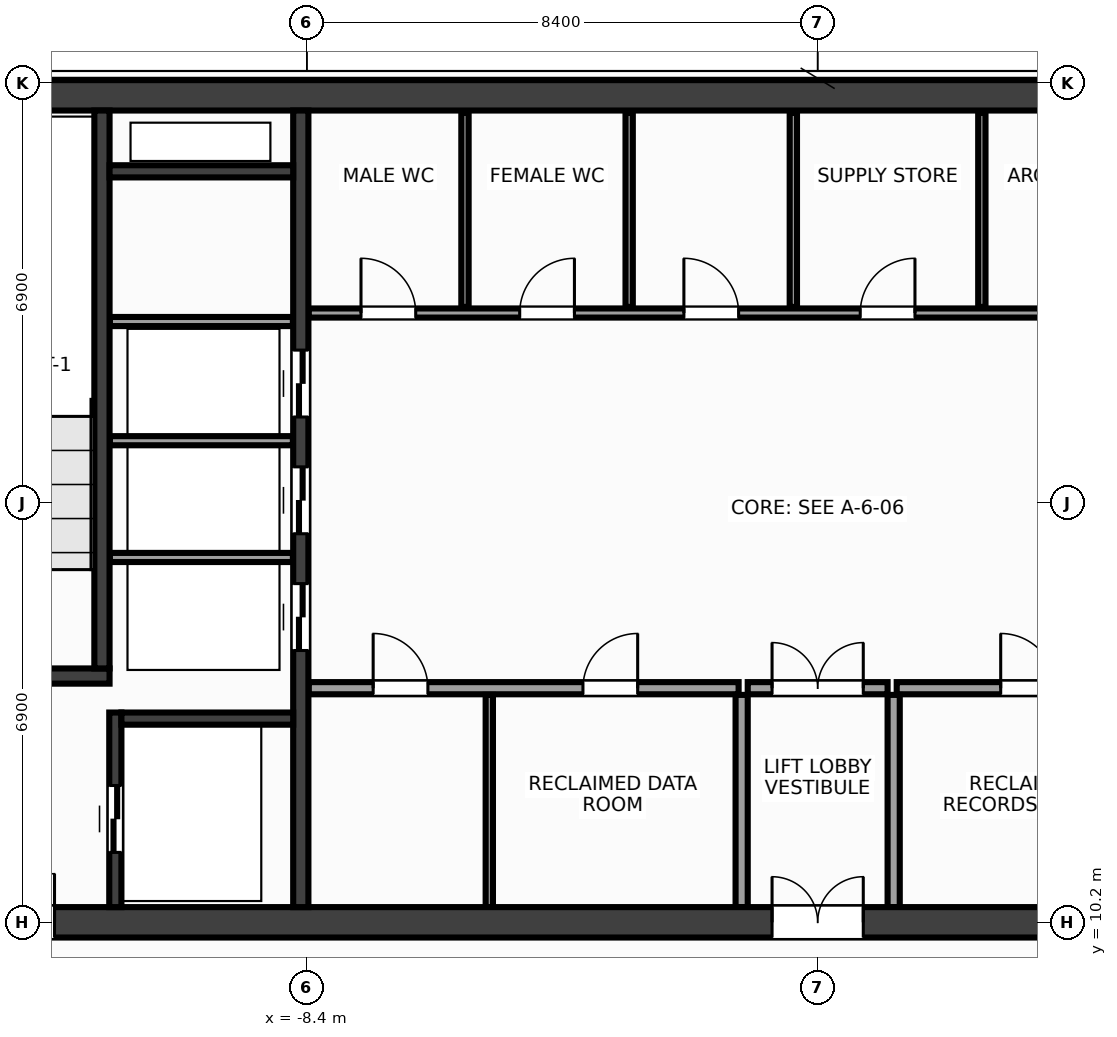
"""IFC4 building model, lengths in metres.
Left out: names, types, materials, properties, quantities, classifications, styles, units other than length and angle.
Written with IfcOpenShell. Run it as: python <this file> out.ifc"""

import sys

from ifc_helpers import new_model, si_unit, direction, frame, frame_2d, origin, place, context, subcontext, project, spatial, rectangle, extrude, source, transform, mapped, element, fill, save


model = new_model("IFC4")
c1 = context("Model", 3, precision=1e-05, world=origin(), true_north=direction((0.0, 1.0)))
c2 = subcontext(c1, "Body", "Model", "MODEL_VIEW")
j1 = project(units=[si_unit("LENGTHUNIT", "METRE"), si_unit("PLANEANGLEUNIT", "RADIAN")], contexts=[c1])
p1 = place(None, origin())
s1 = spatial("IfcSite", under=j1, at=p1, CompositionType="ELEMENT")
p2 = place(p1, origin())
s2 = spatial("IfcBuilding", under=s1, at=p2, CompositionType="ELEMENT")
p3 = place(p2, frame((0.0, 0.0, 254.0)))
s3 = spatial("IfcBuildingStorey", under=s2, at=p3, CompositionType="ELEMENT", Elevation=254.0)
m1 = source(origin(), c2, "Body", "SweptSolid", [
    extrude(rectangle(XDim=31.7, YDim=0.5, at=frame_2d((15.85, 0.0))), origin(), (0.0, 0.0, 1.0), 3.6),
])
p4 = place(p3, frame((-15.85, 23.8, 0.0), z_axis=(0.0, 0.0, 1.0), x_axis=(1.0, 0.0, 0.0)))
e1 = element("IfcWall", 1, at=p4, inside=s3, PredefinedType="SHEAR", context=c2, shape_type="MappedRepresentation", body=[
    mapped(m1, transform((0.0, 0.0, 0.0), x_axis=(1.0, 0.0, 0.0), y_axis=(0.0, 1.0, 0.0), z_axis=(0.0, 0.0, 1.0), scale=1.0)),
])
p5 = place(p3, frame((-15.85, 10.2, 0.0), z_axis=(0.0, 0.0, 1.0), x_axis=(1.0, 0.0, 0.0)))
e2 = element("IfcWall", 2, at=p5, inside=s3, PredefinedType="SHEAR", context=c2, shape_type="MappedRepresentation", body=[
    mapped(m1, transform((0.0, 0.0, 0.0), x_axis=(1.0, 0.0, 0.0), y_axis=(0.0, 1.0, 0.0), z_axis=(0.0, 0.0, 1.0), scale=1.0)),
])
p6 = place(p5, frame((1.7, 0.0, 0.0)))
e3 = element("IfcOpeningElement", 3, at=p6, cuts=e2, PredefinedType="OPENING", context=c2, shape_type="SweptSolid", body=[
    extrude(rectangle(XDim=1.6, YDim=2.15, at=frame_2d((0.8, 1.075))), frame((0.0, 0.262, 0.0), z_axis=(0.0, -1.0, 0.0), x_axis=(1.0, 0.0, 0.0)), (0.0, 0.0, 1.0), 0.524),
])
p7 = place(p5, frame((28.4, 0.0, 0.0)))
e4 = element("IfcOpeningElement", 4, at=p7, cuts=e2, PredefinedType="OPENING", context=c2, shape_type="SweptSolid", body=[
    extrude(rectangle(XDim=1.6, YDim=2.15, at=frame_2d((0.8, 1.075))), frame((0.0, 0.262, 0.0), z_axis=(0.0, -1.0, 0.0), x_axis=(1.0, 0.0, 0.0)), (0.0, 0.0, 1.0), 0.524),
])
p8 = place(p5, frame((15.1, 0.0, 0.0)))
e5 = element("IfcOpeningElement", 5, at=p8, cuts=e2, PredefinedType="OPENING", context=c2, shape_type="SweptSolid", body=[
    extrude(rectangle(XDim=1.5, YDim=2.2, at=frame_2d((0.75, 1.1))), frame((0.0, 0.262, 0.0), z_axis=(0.0, -1.0, 0.0), x_axis=(1.0, 0.0, 0.0)), (0.0, 0.0, 1.0), 0.524),
])
m2 = source(origin(), c2, "Body", "SweptSolid", [
    extrude(rectangle(XDim=13.1, YDim=0.25, at=frame_2d((6.55, 0.0))), origin(), (0.0, 0.0, 1.0), 3.6),
])
p9 = place(p3, frame((-8.5, 10.45, 0.0), z_axis=(0.0, 0.0, 1.0), x_axis=(0.0, 1.0, 0.0)))
e6 = element("IfcWall", 6, at=p9, inside=s3, PredefinedType="SHEAR", context=c2, shape_type="MappedRepresentation", body=[
    mapped(m2, transform((0.0, 0.0, 0.0), x_axis=(1.0, 0.0, 0.0), y_axis=(0.0, 1.0, 0.0), z_axis=(0.0, 0.0, 1.0), scale=1.0)),
])
p10 = place(p9, frame((4.22, 0.0, 0.0)))
e7 = element("IfcOpeningElement", 7, at=p10, cuts=e6, PredefinedType="OPENING", context=c2, shape_type="SweptSolid", body=[
    extrude(rectangle(XDim=1.1, YDim=2.15, at=frame_2d((0.55, 1.075))), frame((0.0, 0.137, 0.0), z_axis=(0.0, -1.0, 0.0), x_axis=(1.0, 0.0, 0.0)), (0.0, 0.0, 1.0), 0.274),
])
p11 = place(p9, frame((6.14, 0.0, 0.0)))
e8 = element("IfcOpeningElement", 8, at=p11, cuts=e6, PredefinedType="OPENING", context=c2, shape_type="SweptSolid", body=[
    extrude(rectangle(XDim=1.1, YDim=2.15, at=frame_2d((0.55, 1.075))), frame((0.0, 0.137, 0.0), z_axis=(0.0, -1.0, 0.0), x_axis=(1.0, 0.0, 0.0)), (0.0, 0.0, 1.0), 0.274),
])
p12 = place(p9, frame((8.06, 0.0, 0.0)))
e9 = element("IfcOpeningElement", 9, at=p12, cuts=e6, PredefinedType="OPENING", context=c2, shape_type="SweptSolid", body=[
    extrude(rectangle(XDim=1.1, YDim=2.15, at=frame_2d((0.55, 1.075))), frame((0.0, 0.137, 0.0), z_axis=(0.0, -1.0, 0.0), x_axis=(1.0, 0.0, 0.0)), (0.0, 0.0, 1.0), 0.274),
])
m3 = source(origin(), c2, "Body", "SweptSolid", [
    extrude(rectangle(XDim=3.705, YDim=0.25, at=frame_2d((1.853, 0.0))), origin(), (0.0, 0.0, 1.0), 3.6),
])
p13 = place(p3, frame((-15.35, 14.25, 0.0), z_axis=(0.0, 0.0, 1.0), x_axis=(1.0, 0.0, 0.0)))
e10 = element("IfcWall", 10, at=p13, inside=s3, PredefinedType="SHEAR", context=c2, shape_type="MappedRepresentation", body=[
    mapped(m3, transform((0.0, 0.0, 0.0), x_axis=(1.0, 0.0, 0.0), y_axis=(0.0, 1.0, 0.0), z_axis=(0.0, 0.0, 1.0), scale=1.0)),
])
p14 = place(p13, frame((0.95, 0.0, 0.0)))
e11 = element("IfcOpeningElement", 11, at=p14, cuts=e10, PredefinedType="OPENING", context=c2, shape_type="SweptSolid", body=[
    extrude(rectangle(XDim=1.6, YDim=2.15, at=frame_2d((0.8, 1.075))), frame((0.0, 0.137, 0.0), z_axis=(0.0, -1.0, 0.0), x_axis=(1.0, 0.0, 0.0)), (0.0, 0.0, 1.0), 0.274),
])
m4 = source(origin(), c2, "Body", "SweptSolid", [
    extrude(rectangle(XDim=9.175, YDim=0.25, at=frame_2d((4.587, 0.0))), origin(), (0.0, 0.0, 1.0), 3.6),
])
p15 = place(p3, frame((-11.77, 14.375, 0.0), z_axis=(0.0, 0.0, 1.0), x_axis=(0.0, 1.0, 0.0)))
e12 = element("IfcWall", 12, at=p15, inside=s3, PredefinedType="SHEAR", context=c2, shape_type="MappedRepresentation", body=[
    mapped(m4, transform((0.0, 0.0, 0.0), x_axis=(1.0, 0.0, 0.0), y_axis=(0.0, 1.0, 0.0), z_axis=(0.0, 0.0, 1.0), scale=1.0)),
])
m5 = source(origin(), c2, "Body", "SweptSolid", [
    extrude(rectangle(XDim=3.2, YDim=0.2, at=frame_2d((1.6, 0.0))), origin(), (0.0, 0.0, 1.0), 3.6),
])
p16 = place(p3, frame((-11.55, 10.45, 0.0), z_axis=(0.0, 0.0, 1.0), x_axis=(0.0, 1.0, 0.0)))
e13 = element("IfcWall", 13, at=p16, inside=s3, PredefinedType="SHEAR", context=c2, shape_type="MappedRepresentation", body=[
    mapped(m5, transform((0.0, 0.0, 0.0), x_axis=(1.0, 0.0, 0.0), y_axis=(0.0, 1.0, 0.0), z_axis=(0.0, 0.0, 1.0), scale=1.0)),
])
p17 = place(p16, frame((0.9, 0.0, 0.0)))
e14 = element("IfcOpeningElement", 14, at=p17, cuts=e13, PredefinedType="OPENING", context=c2, shape_type="SweptSolid", body=[
    extrude(rectangle(XDim=1.1, YDim=2.15, at=frame_2d((0.55, 1.075))), frame((0.0, 0.112, 0.0), z_axis=(0.0, -1.0, 0.0), x_axis=(1.0, 0.0, 0.0)), (0.0, 0.0, 1.0), 0.224),
])
m6 = source(origin(), c2, "Body", "SweptSolid", [
    extrude(rectangle(XDim=2.825, YDim=0.2, at=frame_2d((1.413, 0.0))), origin(), (0.0, 0.0, 1.0), 3.6),
])
p18 = place(p3, frame((-11.45, 13.55, 0.0), z_axis=(0.0, 0.0, 1.0), x_axis=(1.0, 0.0, 0.0)))
e15 = element("IfcWall", 15, at=p18, inside=s3, PredefinedType="SHEAR", context=c2, shape_type="MappedRepresentation", body=[
    mapped(m6, transform((0.0, 0.0, 0.0), x_axis=(1.0, 0.0, 0.0), y_axis=(0.0, 1.0, 0.0), z_axis=(0.0, 0.0, 1.0), scale=1.0)),
])
m7 = source(origin(), c2, "Body", "SweptSolid", [
    extrude(rectangle(XDim=3.02, YDim=0.2, at=frame_2d((1.51, 0.0))), origin(), (0.0, 0.0, 1.0), 3.6),
])
p19 = place(p3, frame((-11.645, 22.55, 0.0), z_axis=(0.0, 0.0, 1.0), x_axis=(1.0, 0.0, 0.0)))
e16 = element("IfcWall", 16, at=p19, inside=s3, PredefinedType="SHEAR", context=c2, shape_type="MappedRepresentation", body=[
    mapped(m7, transform((0.0, 0.0, 0.0), x_axis=(1.0, 0.0, 0.0), y_axis=(0.0, 1.0, 0.0), z_axis=(0.0, 0.0, 1.0), scale=1.0)),
])
m8 = source(origin(), c2, "Body", "SweptSolid", [
    extrude(rectangle(XDim=3.01, YDim=0.15, at=frame_2d((1.505, 0.0))), origin(), (0.0, 0.0, 1.0), 3.37),
])
for number, where, z_axis, x_axis in (
    (17, (-11.64, 16.2, 0.0), (0.0, 0.0, 1.0), (1.0, 0.0, 0.0)),
    (18, (-11.64, 18.12, 0.0), (0.0, 0.0, 1.0), (1.0, 0.0, 0.0)),
    (19, (-11.64, 20.08, 0.0), (0.0, 0.0, 1.0), (1.0, 0.0, 0.0)),
):
    element("IfcWall", number, at=place(p3, frame(where, z_axis=z_axis, x_axis=x_axis)), inside=s3, PredefinedType="PARTITIONING", context=c2, shape_type="MappedRepresentation", body=[
        mapped(m8, transform((0.0, 0.0, 0.0), x_axis=(1.0, 0.0, 0.0), y_axis=(0.0, 1.0, 0.0), z_axis=(0.0, 0.0, 1.0), scale=1.0)),
    ])
m9 = source(origin(), c2, "Body", "SweptSolid", [
    extrude(rectangle(XDim=7.07, YDim=0.2, at=frame_2d((3.535, 0.0))), origin(), (0.0, 0.0, 1.0), 3.37),
])
p20 = place(p3, frame((-8.37, 14.05, 0.0), z_axis=(0.0, 0.0, 1.0), x_axis=(1.0, 0.0, 0.0)))
e20 = element("IfcWall", 20, at=p20, inside=s3, PredefinedType="PARTITIONING", context=c2, shape_type="MappedRepresentation", body=[
    mapped(m9, transform((0.0, 0.0, 0.0), x_axis=(1.0, 0.0, 0.0), y_axis=(0.0, 1.0, 0.0), z_axis=(0.0, 0.0, 1.0), scale=1.0)),
])
p21 = place(p20, frame((1.06, 0.0, 0.0)))
e21 = element("IfcOpeningElement", 21, at=p21, cuts=e20, PredefinedType="OPENING", context=c2, shape_type="SweptSolid", body=[
    extrude(rectangle(XDim=0.9, YDim=2.15, at=frame_2d((0.45, 1.075))), frame((0.0, 0.112, 0.0), z_axis=(0.0, -1.0, 0.0), x_axis=(1.0, 0.0, 0.0)), (0.0, 0.0, 1.0), 0.224),
])
p22 = place(p20, frame((4.51, 0.0, 0.0)))
e22 = element("IfcOpeningElement", 22, at=p22, cuts=e20, PredefinedType="OPENING", context=c2, shape_type="SweptSolid", body=[
    extrude(rectangle(XDim=0.9, YDim=2.15, at=frame_2d((0.45, 1.075))), frame((0.0, 0.112, 0.0), z_axis=(0.0, -1.0, 0.0), x_axis=(1.0, 0.0, 0.0)), (0.0, 0.0, 1.0), 0.224),
])
p23 = place(p3, frame((1.3, 14.05, 0.0), z_axis=(0.0, 0.0, 1.0), x_axis=(1.0, 0.0, 0.0)))
e23 = element("IfcWall", 23, at=p23, inside=s3, PredefinedType="PARTITIONING", context=c2, shape_type="MappedRepresentation", body=[
    mapped(m9, transform((0.0, 0.0, 0.0), x_axis=(1.0, 0.0, 0.0), y_axis=(0.0, 1.0, 0.0), z_axis=(0.0, 0.0, 1.0), scale=1.0)),
])
p24 = place(p23, frame((1.71, 0.0, 0.0)))
e24 = element("IfcOpeningElement", 24, at=p24, cuts=e23, PredefinedType="OPENING", context=c2, shape_type="SweptSolid", body=[
    extrude(rectangle(XDim=0.9, YDim=2.15, at=frame_2d((0.45, 1.075))), frame((0.0, 0.112, 0.0), z_axis=(0.0, -1.0, 0.0), x_axis=(1.0, 0.0, 0.0)), (0.0, 0.0, 1.0), 0.224),
])
p25 = place(p23, frame((5.16, 0.0, 0.0)))
e25 = element("IfcOpeningElement", 25, at=p25, cuts=e23, PredefinedType="OPENING", context=c2, shape_type="SweptSolid", body=[
    extrude(rectangle(XDim=0.9, YDim=2.15, at=frame_2d((0.45, 1.075))), frame((0.0, 0.112, 0.0), z_axis=(0.0, -1.0, 0.0), x_axis=(1.0, 0.0, 0.0)), (0.0, 0.0, 1.0), 0.224),
])
m10 = source(origin(), c2, "Body", "SweptSolid", [
    extrude(rectangle(XDim=3.49, YDim=0.2, at=frame_2d((1.745, 0.0))), origin(), (0.0, 0.0, 1.0), 3.37),
])
for number, where, z_axis, x_axis in (
    (26, (-1.25, 10.45, 0.0), (0.0, 0.0, 1.0), (0.0, 1.0, 0.0)),
    (27, (1.25, 10.45, 0.0), (0.0, 0.0, 1.0), (0.0, 1.0, 0.0)),
):
    element("IfcWall", number, at=place(p3, frame(where, z_axis=z_axis, x_axis=x_axis)), inside=s3, PredefinedType="PARTITIONING", context=c2, shape_type="MappedRepresentation", body=[
        mapped(m10, transform((0.0, 0.0, 0.0), x_axis=(1.0, 0.0, 0.0), y_axis=(0.0, 1.0, 0.0), z_axis=(0.0, 0.0, 1.0), scale=1.0)),
    ])
m11 = source(origin(), c2, "Body", "SweptSolid", [
    extrude(rectangle(XDim=2.3, YDim=0.2, at=frame_2d((1.15, 0.0))), origin(), (0.0, 0.0, 1.0), 3.37),
])
p26 = place(p3, frame((-1.15, 14.05, 0.0), z_axis=(0.0, 0.0, 1.0), x_axis=(1.0, 0.0, 0.0)))
e28 = element("IfcWall", 28, at=p26, inside=s3, PredefinedType="PARTITIONING", context=c2, shape_type="MappedRepresentation", body=[
    mapped(m11, transform((0.0, 0.0, 0.0), x_axis=(1.0, 0.0, 0.0), y_axis=(0.0, 1.0, 0.0), z_axis=(0.0, 0.0, 1.0), scale=1.0)),
])
p27 = place(p26, frame((0.4, 0.0, 0.0)))
e29 = element("IfcOpeningElement", 29, at=p27, cuts=e28, PredefinedType="OPENING", context=c2, shape_type="SweptSolid", body=[
    extrude(rectangle(XDim=1.5, YDim=2.2, at=frame_2d((0.75, 1.1))), frame((0.0, 0.112, 0.0), z_axis=(0.0, -1.0, 0.0), x_axis=(1.0, 0.0, 0.0)), (0.0, 0.0, 1.0), 0.224),
])
m12 = source(origin(), c2, "Body", "SweptSolid", [
    extrude(rectangle(XDim=14.59, YDim=0.15, at=frame_2d((7.295, 0.0))), origin(), (0.0, 0.0, 1.0), 3.37),
])
p28 = place(p3, frame((-8.37, 20.22, 0.0), z_axis=(0.0, 0.0, 1.0), x_axis=(1.0, 0.0, 0.0)))
e30 = element("IfcWall", 30, at=p28, inside=s3, PredefinedType="PARTITIONING", context=c2, shape_type="MappedRepresentation", body=[
    mapped(m12, transform((0.0, 0.0, 0.0), x_axis=(1.0, 0.0, 0.0), y_axis=(0.0, 1.0, 0.0), z_axis=(0.0, 0.0, 1.0), scale=1.0)),
])
p29 = place(p28, frame((0.86, 0.0, 0.0)))
e31 = element("IfcOpeningElement", 31, at=p29, cuts=e30, PredefinedType="OPENING", context=c2, shape_type="SweptSolid", body=[
    extrude(rectangle(XDim=0.9, YDim=2.15, at=frame_2d((0.45, 1.075))), frame((0.0, 0.087, 0.0), z_axis=(0.0, -1.0, 0.0), x_axis=(1.0, 0.0, 0.0)), (0.0, 0.0, 1.0), 0.174),
])
p30 = place(p28, frame((3.47, 0.0, 0.0)))
e32 = element("IfcOpeningElement", 32, at=p30, cuts=e30, PredefinedType="OPENING", context=c2, shape_type="SweptSolid", body=[
    extrude(rectangle(XDim=0.9, YDim=2.15, at=frame_2d((0.45, 1.075))), frame((0.0, 0.087, 0.0), z_axis=(0.0, -1.0, 0.0), x_axis=(1.0, 0.0, 0.0)), (0.0, 0.0, 1.0), 0.174),
])
p31 = place(p28, frame((6.17, 0.0, 0.0)))
e33 = element("IfcOpeningElement", 33, at=p31, cuts=e30, PredefinedType="OPENING", context=c2, shape_type="SweptSolid", body=[
    extrude(rectangle(XDim=0.9, YDim=2.15, at=frame_2d((0.45, 1.075))), frame((0.0, 0.087, 0.0), z_axis=(0.0, -1.0, 0.0), x_axis=(1.0, 0.0, 0.0)), (0.0, 0.0, 1.0), 0.174),
])
p32 = place(p28, frame((9.07, 0.0, 0.0)))
e34 = element("IfcOpeningElement", 34, at=p32, cuts=e30, PredefinedType="OPENING", context=c2, shape_type="SweptSolid", body=[
    extrude(rectangle(XDim=0.9, YDim=2.15, at=frame_2d((0.45, 1.075))), frame((0.0, 0.087, 0.0), z_axis=(0.0, -1.0, 0.0), x_axis=(1.0, 0.0, 0.0)), (0.0, 0.0, 1.0), 0.174),
])
p33 = place(p28, frame((12.32, 0.0, 0.0)))
e35 = element("IfcOpeningElement", 35, at=p33, cuts=e30, PredefinedType="OPENING", context=c2, shape_type="SweptSolid", body=[
    extrude(rectangle(XDim=0.9, YDim=2.15, at=frame_2d((0.45, 1.075))), frame((0.0, 0.087, 0.0), z_axis=(0.0, -1.0, 0.0), x_axis=(1.0, 0.0, 0.0)), (0.0, 0.0, 1.0), 0.174),
])
m13 = source(origin(), c2, "Body", "SweptSolid", [
    extrude(rectangle(XDim=3.49, YDim=0.12, at=frame_2d((1.745, 0.0))), origin(), (0.0, 0.0, 1.0), 3.37),
])
p34 = place(p3, frame((-5.4, 10.45, 0.0), z_axis=(0.0, 0.0, 1.0), x_axis=(0.0, 1.0, 0.0)))
e36 = element("IfcWall", 36, at=p34, inside=s3, PredefinedType="PARTITIONING", context=c2, shape_type="MappedRepresentation", body=[
    mapped(m13, transform((0.0, 0.0, 0.0), x_axis=(1.0, 0.0, 0.0), y_axis=(0.0, 1.0, 0.0), z_axis=(0.0, 0.0, 1.0), scale=1.0)),
])
m14 = source(origin(), c2, "Body", "SweptSolid", [
    extrude(rectangle(XDim=3.19, YDim=0.12, at=frame_2d((1.595, 0.0))), origin(), (0.0, 0.0, 1.0), 3.37),
])
for number, where, z_axis, x_axis in (
    (37, (-5.8, 20.32, 0.0), (0.0, 0.0, 1.0), (0.0, 1.0, 0.0)),
    (38, (-3.1, 20.32, 0.0), (0.0, 0.0, 1.0), (0.0, 1.0, 0.0)),
    (39, (-0.4, 20.32, 0.0), (0.0, 0.0, 1.0), (0.0, 1.0, 0.0)),
    (40, (2.7, 20.32, 0.0), (0.0, 0.0, 1.0), (0.0, 1.0, 0.0)),
):
    element("IfcWall", number, at=place(p3, frame(where, z_axis=z_axis, x_axis=x_axis)), inside=s3, PredefinedType="PARTITIONING", context=c2, shape_type="MappedRepresentation", body=[
        mapped(m14, transform((0.0, 0.0, 0.0), x_axis=(1.0, 0.0, 0.0), y_axis=(0.0, 1.0, 0.0), z_axis=(0.0, 0.0, 1.0), scale=1.0)),
    ])
m15 = source(origin(), c2, "Body", "SweptSolid", [
    extrude(rectangle(XDim=1.6, YDim=2.15, at=frame_2d((0.8, 1.075))), frame((0.0, 0.025, 0.0), z_axis=(0.0, -1.0, 0.0), x_axis=(1.0, 0.0, 0.0)), (0.0, 0.0, 1.0), 0.05),
])
p35 = place(p6, origin())
e41 = element("IfcDoor", 41, at=p35, inside=s3, OperationType="DOUBLE_DOOR_SINGLE_SWING", PredefinedType="DOOR", context=c2, shape_type="MappedRepresentation", body=[
    mapped(m15, transform((0.0, 0.0, 0.0), x_axis=(1.0, 0.0, 0.0), y_axis=(0.0, 1.0, 0.0), z_axis=(0.0, 0.0, 1.0), scale=1.0)),
])
fill(e3, e41)
m16 = source(origin(), c2, "Body", "SweptSolid", [
    extrude(rectangle(XDim=1.1, YDim=2.15, at=frame_2d((0.55, 1.075))), frame((0.0, 0.025, 0.0), z_axis=(0.0, -1.0, 0.0), x_axis=(1.0, 0.0, 0.0)), (0.0, 0.0, 1.0), 0.05),
])
p36 = place(p17, origin())
e42 = element("IfcDoor", 42, at=p36, inside=s3, OperationType="DOUBLE_DOOR_SLIDING", PredefinedType="DOOR", context=c2, shape_type="MappedRepresentation", body=[
    mapped(m16, transform((0.0, 0.0, 0.0), x_axis=(1.0, 0.0, 0.0), y_axis=(0.0, 1.0, 0.0), z_axis=(0.0, 0.0, 1.0), scale=1.0)),
])
fill(e14, e42)
p37 = place(p10, origin())
e43 = element("IfcDoor", 43, at=p37, inside=s3, OperationType="DOUBLE_DOOR_SLIDING", PredefinedType="DOOR", context=c2, shape_type="MappedRepresentation", body=[
    mapped(m16, transform((0.0, 0.0, 0.0), x_axis=(1.0, 0.0, 0.0), y_axis=(0.0, 1.0, 0.0), z_axis=(0.0, 0.0, 1.0), scale=1.0)),
])
fill(e7, e43)
p38 = place(p11, origin())
e44 = element("IfcDoor", 44, at=p38, inside=s3, OperationType="DOUBLE_DOOR_SLIDING", PredefinedType="DOOR", context=c2, shape_type="MappedRepresentation", body=[
    mapped(m16, transform((0.0, 0.0, 0.0), x_axis=(1.0, 0.0, 0.0), y_axis=(0.0, 1.0, 0.0), z_axis=(0.0, 0.0, 1.0), scale=1.0)),
])
fill(e8, e44)
p39 = place(p12, origin())
e45 = element("IfcDoor", 45, at=p39, inside=s3, OperationType="DOUBLE_DOOR_SLIDING", PredefinedType="DOOR", context=c2, shape_type="MappedRepresentation", body=[
    mapped(m16, transform((0.0, 0.0, 0.0), x_axis=(1.0, 0.0, 0.0), y_axis=(0.0, 1.0, 0.0), z_axis=(0.0, 0.0, 1.0), scale=1.0)),
])
fill(e9, e45)
m17 = source(origin(), c2, "Body", "SweptSolid", [
    extrude(rectangle(XDim=0.9, YDim=2.15, at=frame_2d((0.45, 1.075))), frame((0.0, 0.025, 0.0), z_axis=(0.0, -1.0, 0.0), x_axis=(1.0, 0.0, 0.0)), (0.0, 0.0, 1.0), 0.05),
])
p40 = place(p21, origin())
e46 = element("IfcDoor", 46, at=p40, inside=s3, OperationType="SINGLE_SWING_LEFT", PredefinedType="DOOR", context=c2, shape_type="MappedRepresentation", body=[
    mapped(m17, transform((0.0, 0.0, 0.0), x_axis=(1.0, 0.0, 0.0), y_axis=(0.0, 1.0, 0.0), z_axis=(0.0, 0.0, 1.0), scale=1.0)),
])
fill(e21, e46)
p41 = place(p22, origin())
e47 = element("IfcDoor", 47, at=p41, inside=s3, OperationType="SINGLE_SWING_RIGHT", PredefinedType="DOOR", context=c2, shape_type="MappedRepresentation", body=[
    mapped(m17, transform((0.0, 0.0, 0.0), x_axis=(1.0, 0.0, 0.0), y_axis=(0.0, 1.0, 0.0), z_axis=(0.0, 0.0, 1.0), scale=1.0)),
])
fill(e22, e47)
p42 = place(p24, origin())
e48 = element("IfcDoor", 48, at=p42, inside=s3, OperationType="SINGLE_SWING_LEFT", PredefinedType="DOOR", context=c2, shape_type="MappedRepresentation", body=[
    mapped(m17, transform((0.0, 0.0, 0.0), x_axis=(1.0, 0.0, 0.0), y_axis=(0.0, 1.0, 0.0), z_axis=(0.0, 0.0, 1.0), scale=1.0)),
])
fill(e24, e48)
m18 = source(origin(), c2, "Body", "SweptSolid", [
    extrude(rectangle(XDim=1.5, YDim=2.2, at=frame_2d((0.75, 1.1))), frame((0.0, 0.025, 0.0), z_axis=(0.0, -1.0, 0.0), x_axis=(1.0, 0.0, 0.0)), (0.0, 0.0, 1.0), 0.05),
])
p43 = place(p27, origin())
e49 = element("IfcDoor", 49, at=p43, inside=s3, OperationType="DOUBLE_DOOR_SINGLE_SWING", PredefinedType="DOOR", context=c2, shape_type="MappedRepresentation", body=[
    mapped(m18, transform((0.0, 0.0, 0.0), x_axis=(1.0, 0.0, 0.0), y_axis=(0.0, 1.0, 0.0), z_axis=(0.0, 0.0, 1.0), scale=1.0)),
])
fill(e29, e49)
p44 = place(p8, origin())
e50 = element("IfcDoor", 50, at=p44, inside=s3, OperationType="DOUBLE_DOOR_SINGLE_SWING", PredefinedType="DOOR", context=c2, shape_type="MappedRepresentation", body=[
    mapped(m18, transform((0.0, 0.0, 0.0), x_axis=(1.0, 0.0, 0.0), y_axis=(0.0, 1.0, 0.0), z_axis=(0.0, 0.0, 1.0), scale=1.0)),
])
fill(e5, e50)
p45 = place(p29, origin())
e51 = element("IfcDoor", 51, at=p45, inside=s3, OperationType="SINGLE_SWING_LEFT", PredefinedType="DOOR", context=c2, shape_type="MappedRepresentation", body=[
    mapped(m17, transform((0.0, 0.0, 0.0), x_axis=(1.0, 0.0, 0.0), y_axis=(0.0, 1.0, 0.0), z_axis=(0.0, 0.0, 1.0), scale=1.0)),
])
fill(e31, e51)
p46 = place(p30, origin())
e52 = element("IfcDoor", 52, at=p46, inside=s3, OperationType="SINGLE_SWING_RIGHT", PredefinedType="DOOR", context=c2, shape_type="MappedRepresentation", body=[
    mapped(m17, transform((0.0, 0.0, 0.0), x_axis=(1.0, 0.0, 0.0), y_axis=(0.0, 1.0, 0.0), z_axis=(0.0, 0.0, 1.0), scale=1.0)),
])
fill(e32, e52)
p47 = place(p31, origin())
e53 = element("IfcDoor", 53, at=p47, inside=s3, OperationType="SINGLE_SWING_LEFT", PredefinedType="DOOR", context=c2, shape_type="MappedRepresentation", body=[
    mapped(m17, transform((0.0, 0.0, 0.0), x_axis=(1.0, 0.0, 0.0), y_axis=(0.0, 1.0, 0.0), z_axis=(0.0, 0.0, 1.0), scale=1.0)),
])
fill(e33, e53)
p48 = place(p32, origin())
e54 = element("IfcDoor", 54, at=p48, inside=s3, OperationType="SINGLE_SWING_RIGHT", PredefinedType="DOOR", context=c2, shape_type="MappedRepresentation", body=[
    mapped(m17, transform((0.0, 0.0, 0.0), x_axis=(1.0, 0.0, 0.0), y_axis=(0.0, 1.0, 0.0), z_axis=(0.0, 0.0, 1.0), scale=1.0)),
])
fill(e34, e54)
save(model, sys.argv[1])
